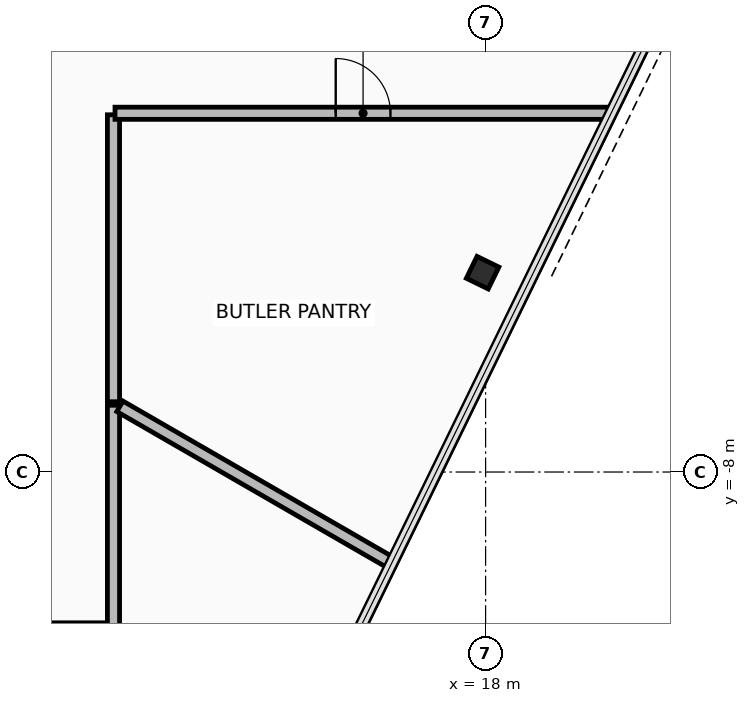
"""IFC4 building model, lengths in metres.
Left out: names, types, materials, properties, quantities, classifications, styles, units other than length and angle.
Written with IfcOpenShell. Run it as: python <this file> out.ifc"""

import sys

from ifc_helpers import new_model, si_unit, direction, frame, frame_2d, origin, origin_2d, place, context, subcontext, project, spatial, rectangle, hollow_rectangle, extrude, element, fill, save


model = new_model("IFC4")
c1 = context("Model", 3, precision=1e-05, world=origin(), true_north=direction((0.0, 1.0)))
c2 = subcontext(c1, "Body", "Model", "MODEL_VIEW")
j1 = project(units=[si_unit("LENGTHUNIT", "METRE"), si_unit("PLANEANGLEUNIT", "RADIAN")], contexts=[c1])
p1 = place(None, origin())
s1 = spatial("IfcSite", under=j1, at=p1, CompositionType="ELEMENT")
p2 = place(p1, origin())
s2 = spatial("IfcBuilding", under=s1, at=p2, CompositionType="ELEMENT")
p3 = place(p2, frame((0.0, 0.0, 260.6)))
s3 = spatial("IfcBuildingStorey", under=s2, at=p3, CompositionType="ELEMENT", Elevation=260.6)
p4 = place(p3, frame((17.951, -4.722, 0.0), z_axis=(0.0, 0.0, 1.0), x_axis=(0.43837271548, 0.898793281196, 0.0)))
e1 = element("IfcColumn", 1, at=p4, inside=s3, PredefinedType="COLUMN", context=c2, shape_type="SweptSolid", body=[
    extrude(hollow_rectangle(XDim=0.4, YDim=0.4, WallThickness=0.025, at=origin_2d()), origin(), (0.0, 0.0, 1.0), 3.6),
])
p5 = place(p3, frame((4.825, -10.58, 0.0), z_axis=(0.0, 0.0, 1.0), x_axis=(1.0, 0.0, 0.0)))
e2 = element("IfcWall", 2, at=p5, inside=s3, PredefinedType="PARTITIONING", context=c2, shape_type="SweptSolid", body=[
    extrude(rectangle(XDim=7.054, YDim=0.2, at=frame_2d((3.527, 0.0))), origin(), (0.0, 0.0, 1.0), 2.915),
])
p6 = place(p5, frame((2.927, 0.0, 0.0)))
e3 = element("IfcOpeningElement", 3, at=p6, cuts=e2, PredefinedType="OPENING", context=c2, shape_type="SweptSolid", body=[
    extrude(rectangle(XDim=1.2, YDim=2.15, at=frame_2d((0.6, 1.075))), frame((0.0, 0.11, 0.0), z_axis=(0.0, -1.0, 0.0), x_axis=(1.0, 0.0, 0.0)), (0.0, 0.0, 1.0), 0.22),
])
p7 = place(p3, frame((11.88, -10.579, 0.0), z_axis=(0.0, 0.0, 1.0), x_axis=(0.0, 1.0, 0.0)))
e4 = element("IfcWall", 4, at=p7, inside=s3, PredefinedType="PARTITIONING", context=c2, shape_type="SweptSolid", body=[
    extrude(rectangle(XDim=3.677, YDim=0.2, at=frame_2d((1.839, 0.0))), origin(), (0.0, 0.0, 1.0), 3.115),
])
p8 = place(p3, frame((11.985, -6.92, 0.0), z_axis=(0.0, 0.0, 1.0), x_axis=(0.866041575714, -0.49997198835, 0.0)))
e5 = element("IfcWall", 5, at=p8, inside=s3, PredefinedType="PARTITIONING", context=c2, shape_type="SweptSolid", body=[
    extrude(rectangle(XDim=5.138, YDim=0.2, at=frame_2d((2.569, 0.0))), origin(), (0.0, 0.0, 1.0), 2.765),
])
p9 = place(p3, frame((11.88, -6.844, 0.0), z_axis=(0.0, 0.0, 1.0), x_axis=(0.0, 1.0, 0.0)))
e6 = element("IfcWall", 6, at=p9, inside=s3, PredefinedType="PARTITIONING", context=c2, shape_type="SweptSolid", body=[
    extrude(rectangle(XDim=4.719, YDim=0.2, at=frame_2d((2.36, 0.0))), origin(), (0.0, 0.0, 1.0), 2.915),
])
p10 = place(p3, frame((11.905, -2.1, 0.0), z_axis=(0.0, 0.0, 1.0), x_axis=(1.0, 0.0, 0.0)))
e7 = element("IfcWall", 7, at=p10, inside=s3, PredefinedType="PARTITIONING", context=c2, shape_type="SweptSolid", body=[
    extrude(rectangle(XDim=8.159, YDim=0.2, at=frame_2d((4.08, 0.0))), origin(), (0.0, 0.0, 1.0), 2.765),
])
p11 = place(p10, frame((3.63, 0.0, 0.0)))
e8 = element("IfcOpeningElement", 8, at=p11, cuts=e7, PredefinedType="OPENING", context=c2, shape_type="SweptSolid", body=[
    extrude(rectangle(XDim=0.9, YDim=2.1, at=frame_2d((0.45, 1.05))), frame((0.0, 0.11, 0.0), z_axis=(0.0, -1.0, 0.0), x_axis=(1.0, 0.0, 0.0)), (0.0, 0.0, 1.0), 0.22),
])
p12 = place(p11, origin())
e9 = element("IfcDoor", 9, at=p12, inside=s3, OperationType="SINGLE_SWING_LEFT", PredefinedType="DOOR", context=c2, shape_type="SweptSolid", body=[
    extrude(rectangle(XDim=0.9, YDim=2.1, at=frame_2d((0.45, 1.05))), frame((0.0, 0.025, 0.0), z_axis=(0.0, -1.0, 0.0), x_axis=(1.0, 0.0, 0.0)), (0.0, 0.0, 1.0), 0.05),
])
fill(e8, e9)
save(model, sys.argv[1])
